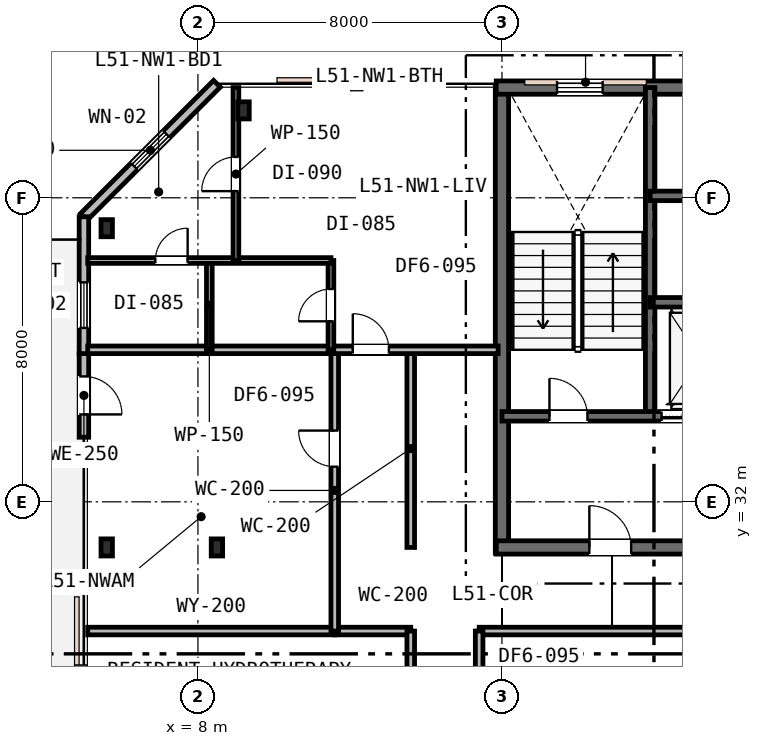
"""IFC4 building model, lengths in metres.
Left out: names, types, materials, properties, quantities, classifications, styles, units other than length and angle.
Written with IfcOpenShell. Run it as: python <this file> out.ifc"""

import sys

from ifc_helpers import new_model, si_unit, direction, frame, frame_2d, origin, origin_2d, place, context, subcontext, project, spatial, rectangle, i_section, extrude, element, fill, save


model = new_model("IFC4")
c1 = context("Model", 3, precision=1e-05, world=origin(), true_north=direction((0.0, 1.0)))
c2 = subcontext(c1, "Body", "Model", "MODEL_VIEW")
j1 = project(units=[si_unit("LENGTHUNIT", "METRE"), si_unit("PLANEANGLEUNIT", "RADIAN")], contexts=[c1])
p1 = place(None, origin())
s1 = spatial("IfcSite", under=j1, at=p1, CompositionType="ELEMENT")
p2 = place(p1, origin())
s2 = spatial("IfcBuilding", under=s1, at=p2, CompositionType="ELEMENT")
p3 = place(p2, frame((0.0, 0.0, 197.4)))
s3 = spatial("IfcBuildingStorey", under=s2, at=p3, CompositionType="ELEMENT", Elevation=197.4)
p4 = place(p3, frame((16.0, 30.65, 0.0), z_axis=(0.0, 0.0, 1.0), x_axis=(0.0, 1.0, 0.0)))
e1 = element("IfcWall", 1, at=p4, inside=s3, PredefinedType="SHEAR", context=c2, shape_type="SweptSolid", body=[
    extrude(rectangle(XDim=12.3, YDim=0.35, at=frame_2d((6.15, 0.0))), origin(), (0.0, 0.0, 1.0), 3.6),
])
p5 = place(p3, frame((15.85, 42.9, 0.0), z_axis=(0.0, 0.0, 1.0), x_axis=(1.0, 0.0, 0.0)))
e2 = element("IfcWall", 2, at=p5, inside=s3, PredefinedType="SHEAR", context=c2, shape_type="SweptSolid", body=[
    extrude(rectangle(XDim=24.3, YDim=0.35, at=frame_2d((12.15, 0.0))), origin(), (0.0, 0.0, 1.0), 3.6),
])
p6 = place(p5, frame((1.6, 0.0, 0.95)))
e3 = element("IfcOpeningElement", 3, at=p6, cuts=e2, PredefinedType="OPENING", context=c2, shape_type="SweptSolid", body=[
    extrude(rectangle(XDim=1.2, YDim=1.6, at=frame_2d((0.6, 0.8))), frame((0.0, 0.185, 0.0), z_axis=(0.0, -1.0, 0.0), x_axis=(1.0, 0.0, 0.0)), (0.0, 0.0, 1.0), 0.37),
])
p7 = place(p5, frame((16.5, 0.0, 0.95)))
e4 = element("IfcOpeningElement", 4, at=p7, cuts=e2, PredefinedType="OPENING", context=c2, shape_type="SweptSolid", body=[
    extrude(rectangle(XDim=1.2, YDim=1.6, at=frame_2d((0.6, 0.8))), frame((0.0, 0.185, 0.0), z_axis=(0.0, -1.0, 0.0), x_axis=(1.0, 0.0, 0.0)), (0.0, 0.0, 1.0), 0.37),
])
p8 = place(p5, frame((21.6, 0.0, 0.95)))
e5 = element("IfcOpeningElement", 5, at=p8, cuts=e2, PredefinedType="OPENING", context=c2, shape_type="SweptSolid", body=[
    extrude(rectangle(XDim=1.2, YDim=1.6, at=frame_2d((0.6, 0.8))), frame((0.0, 0.185, 0.0), z_axis=(0.0, -1.0, 0.0), x_axis=(1.0, 0.0, 0.0)), (0.0, 0.0, 1.0), 0.37),
])
p9 = place(p3, frame((15.85, 30.8, 0.0), z_axis=(0.0, 0.0, 1.0), x_axis=(1.0, 0.0, 0.0)))
e6 = element("IfcWall", 6, at=p9, inside=s3, PredefinedType="SHEAR", context=c2, shape_type="SweptSolid", body=[
    extrude(rectangle(XDim=11.2, YDim=0.35, at=frame_2d((5.6, 0.0))), origin(), (0.0, 0.0, 1.0), 3.6),
])
p10 = place(p9, frame((2.45, 0.0, 0.0)))
e7 = element("IfcOpeningElement", 7, at=p10, cuts=e6, PredefinedType="OPENING", context=c2, shape_type="SweptSolid", body=[
    extrude(rectangle(XDim=1.1, YDim=2.15, at=frame_2d((0.55, 1.075))), frame((0.0, 0.185, 0.0), z_axis=(0.0, -1.0, 0.0), x_axis=(1.0, 0.0, 0.0)), (0.0, 0.0, 1.0), 0.37),
])
p11 = place(p3, frame((19.9, 34.25, 0.0), z_axis=(0.0, 0.0, 1.0), x_axis=(0.0, 1.0, 0.0)))
e8 = element("IfcWall", 8, at=p11, inside=s3, PredefinedType="SHEAR", context=c2, shape_type="SweptSolid", body=[
    extrude(rectangle(XDim=8.65, YDim=0.25, at=frame_2d((4.325, 0.0))), origin(), (0.0, 0.0, 1.0), 3.6),
])
p12 = place(p3, frame((16.0, 34.25, 0.0), z_axis=(0.0, 0.0, 1.0), x_axis=(1.0, 0.0, 0.0)))
e9 = element("IfcWall", 9, at=p12, inside=s3, PredefinedType="SHEAR", context=c2, shape_type="SweptSolid", body=[
    extrude(rectangle(XDim=6.05, YDim=0.25, at=frame_2d((3.025, 0.0))), origin(), (0.0, 0.0, 1.0), 3.6),
])
p13 = place(p12, frame((1.25, 0.0, 0.0)))
e10 = element("IfcOpeningElement", 10, at=p13, cuts=e9, PredefinedType="OPENING", context=c2, shape_type="SweptSolid", body=[
    extrude(rectangle(XDim=1.0, YDim=2.15, at=frame_2d((0.5, 1.075))), frame((0.0, 0.135, 0.0), z_axis=(0.0, -1.0, 0.0), x_axis=(1.0, 0.0, 0.0)), (0.0, 0.0, 1.0), 0.27),
])
p14 = place(p12, frame((4.2, 0.0, 0.0)))
e11 = element("IfcOpeningElement", 11, at=p14, cuts=e9, PredefinedType="OPENING", context=c2, shape_type="SweptSolid", body=[
    extrude(rectangle(XDim=1.1, YDim=2.15, at=frame_2d((0.55, 1.075))), frame((0.0, 0.135, 0.0), z_axis=(0.0, -1.0, 0.0), x_axis=(1.0, 0.0, 0.0)), (0.0, 0.0, 1.0), 0.27),
])
p15 = place(p3, frame((19.9, 37.25, 0.0), z_axis=(0.0, 0.0, 1.0), x_axis=(1.0, 0.0, 0.0)))
e12 = element("IfcWall", 12, at=p15, inside=s3, PredefinedType="SHEAR", context=c2, shape_type="SweptSolid", body=[
    extrude(rectangle(XDim=16.2, YDim=0.25, at=frame_2d((8.1, 0.0))), origin(), (0.0, 0.0, 1.0), 3.6),
])
p16 = place(p15, frame((12.55, 0.0, 0.0)))
e13 = element("IfcOpeningElement", 13, at=p16, cuts=e12, PredefinedType="OPENING", context=c2, shape_type="SweptSolid", body=[
    extrude(rectangle(XDim=0.9, YDim=2.15, at=frame_2d((0.45, 1.075))), frame((0.0, 0.135, 0.0), z_axis=(0.0, -1.0, 0.0), x_axis=(1.0, 0.0, 0.0)), (0.0, 0.0, 1.0), 0.27),
])
p17 = place(p15, frame((2.5, 0.0, 0.0)))
e14 = element("IfcOpeningElement", 14, at=p17, cuts=e12, PredefinedType="OPENING", context=c2, shape_type="SweptSolid", body=[
    extrude(rectangle(XDim=1.05, YDim=2.15, at=frame_2d((0.525, 1.075))), frame((0.0, 0.135, 0.0), z_axis=(0.0, -1.0, 0.0), x_axis=(1.0, 0.0, 0.0)), (0.0, 0.0, 1.0), 0.27),
])
p18 = place(p15, frame((4.4, 0.0, 0.0)))
e15 = element("IfcOpeningElement", 15, at=p18, cuts=e12, PredefinedType="OPENING", context=c2, shape_type="SweptSolid", body=[
    extrude(rectangle(XDim=1.05, YDim=2.15, at=frame_2d((0.525, 1.075))), frame((0.0, 0.135, 0.0), z_axis=(0.0, -1.0, 0.0), x_axis=(1.0, 0.0, 0.0)), (0.0, 0.0, 1.0), 0.27),
])
p19 = place(p15, frame((6.3, 0.0, 0.0)))
e16 = element("IfcOpeningElement", 16, at=p19, cuts=e12, PredefinedType="OPENING", context=c2, shape_type="SweptSolid", body=[
    extrude(rectangle(XDim=1.05, YDim=2.15, at=frame_2d((0.525, 1.075))), frame((0.0, 0.135, 0.0), z_axis=(0.0, -1.0, 0.0), x_axis=(1.0, 0.0, 0.0)), (0.0, 0.0, 1.0), 0.27),
])
p20 = place(p3, frame((19.9, 40.05, 0.0), z_axis=(0.0, 0.0, 1.0), x_axis=(1.0, 0.0, 0.0)))
e17 = element("IfcWall", 17, at=p20, inside=s3, PredefinedType="SHEAR", context=c2, shape_type="SweptSolid", body=[
    extrude(rectangle(XDim=12.05, YDim=0.25, at=frame_2d((6.025, 0.0))), origin(), (0.0, 0.0, 1.0), 3.6),
])
for number, where, z_axis, x_axis in (
    (18, (5.6, 30.8, 0.0), (0.0, 0.0, 1.0), (1.0, 0.0, 0.0)),
    (19, (5.6, 39.2, 0.0), (0.0, 0.0, 1.0), (1.0, 0.0, 0.0)),
    (20, (8.5, 30.8, 0.0), (0.0, 0.0, 1.0), (1.0, 0.0, 0.0)),
    (21, (9.2, 42.3, 0.0), (0.0, 0.0, 1.0), (1.0, 0.0, 0.0)),
):
    element("IfcColumn", number, at=place(p3, frame(where, z_axis=z_axis, x_axis=x_axis)), inside=s3, PredefinedType="COLUMN", context=c2, shape_type="SweptSolid", body=[
        extrude(i_section(OverallWidth=0.3, OverallDepth=0.45, WebThickness=0.014, FlangeThickness=0.026, FilletRadius=0.027, at=origin_2d()), origin(), (0.0, 0.0, 1.0), 3.6),
    ])
p21 = place(p3, frame((8.5, 43.0, 0.0), z_axis=(0.0, 0.0, 1.0), x_axis=(-0.707106781187, -0.707106781187, 0.0)))
e22 = element("IfcWall", 22, at=p21, inside=s3, PredefinedType="STANDARD", context=c2, shape_type="SweptSolid", body=[
    extrude(rectangle(XDim=4.95, YDim=0.25, at=frame_2d((2.475, 0.0))), origin(), (0.0, 0.0, 1.0), 3.33),
])
p22 = place(p21, frame((1.875, 0.0, 0.85)))
e23 = element("IfcOpeningElement", 23, at=p22, cuts=e22, PredefinedType="OPENING", context=c2, shape_type="SweptSolid", body=[
    extrude(rectangle(XDim=1.2, YDim=1.6, at=frame_2d((0.6, 0.8))), frame((0.0, 0.135, 0.0), z_axis=(0.0, -1.0, 0.0), x_axis=(1.0, 0.0, 0.0)), (0.0, 0.0, 1.0), 0.27),
])
p23 = place(p3, frame((5.0, 35.9, 0.0), z_axis=(0.0, 0.0, 1.0), x_axis=(0.0, -1.0, 0.0)))
e24 = element("IfcWall", 24, at=p23, inside=s3, PredefinedType="STANDARD", context=c2, shape_type="SweptSolid", body=[
    extrude(rectangle(XDim=2.2, YDim=0.25, at=frame_2d((1.1, 0.0))), origin(), (0.0, 0.0, 1.0), 3.33),
])
p24 = place(p23, frame((0.6, 0.0, 0.0)))
e25 = element("IfcOpeningElement", 25, at=p24, cuts=e24, PredefinedType="OPENING", context=c2, shape_type="SweptSolid", body=[
    extrude(rectangle(XDim=1.0, YDim=2.15, at=frame_2d((0.5, 1.075))), frame((0.0, 0.135, 0.0), z_axis=(0.0, -1.0, 0.0), x_axis=(1.0, 0.0, 0.0)), (0.0, 0.0, 1.0), 0.27),
])
p25 = place(p3, frame((5.0, 39.5, 0.0), z_axis=(0.0, 0.0, 1.0), x_axis=(0.0, -1.0, 0.0)))
e26 = element("IfcWall", 26, at=p25, inside=s3, PredefinedType="STANDARD", context=c2, shape_type="SweptSolid", body=[
    extrude(rectangle(XDim=3.6, YDim=0.25, at=frame_2d((1.8, 0.0))), origin(), (0.0, 0.0, 1.0), 3.33),
])
p26 = place(p25, frame((1.725, 0.0, 0.85)))
e27 = element("IfcOpeningElement", 27, at=p26, cuts=e26, PredefinedType="OPENING", context=c2, shape_type="SweptSolid", body=[
    extrude(rectangle(XDim=1.2, YDim=1.6, at=frame_2d((0.6, 0.8))), frame((0.0, 0.135, 0.0), z_axis=(0.0, -1.0, 0.0), x_axis=(1.0, 0.0, 0.0)), (0.0, 0.0, 1.0), 0.27),
])
p27 = place(p3, frame((5.1, 28.6, 0.0), z_axis=(0.0, 0.0, 1.0), x_axis=(1.0, 0.0, 0.0)))
e28 = element("IfcWall", 28, at=p27, inside=s3, PredefinedType="PARTITIONING", context=c2, shape_type="SweptSolid", body=[
    extrude(rectangle(XDim=6.5, YDim=0.2, at=frame_2d((3.25, 0.0))), origin(), (0.0, 0.0, 1.0), 2.92),
])
p28 = place(p3, frame((11.6, 28.6, 0.0), z_axis=(0.0, 0.0, 1.0), x_axis=(1.0, 0.0, 0.0)))
e29 = element("IfcWall", 29, at=p28, inside=s3, PredefinedType="PARTITIONING", context=c2, shape_type="SweptSolid", body=[
    extrude(rectangle(XDim=2.0, YDim=0.2, at=frame_2d((1.0, 0.0))), origin(), (0.0, 0.0, 1.0), 3.33),
])
p29 = place(p3, frame((15.4, 28.6, 0.0), z_axis=(0.0, 0.0, 1.0), x_axis=(1.0, 0.0, 0.0)))
e30 = element("IfcWall", 30, at=p29, inside=s3, PredefinedType="PARTITIONING", context=c2, shape_type="SweptSolid", body=[
    extrude(rectangle(XDim=35.5, YDim=0.2, at=frame_2d((17.75, 0.0))), origin(), (0.0, 0.0, 1.0), 2.92),
])
p30 = place(p29, frame((11.525, 0.0, 0.0)))
e31 = element("IfcOpeningElement", 31, at=p30, cuts=e30, PredefinedType="OPENING", context=c2, shape_type="SweptSolid", body=[
    extrude(rectangle(XDim=0.95, YDim=2.15, at=frame_2d((0.475, 1.075))), frame((0.0, 0.11, 0.0), z_axis=(0.0, -1.0, 0.0), x_axis=(1.0, 0.0, 0.0)), (0.0, 0.0, 1.0), 0.22),
])
p31 = place(p29, frame((19.425, 0.0, 0.0)))
e32 = element("IfcOpeningElement", 32, at=p31, cuts=e30, PredefinedType="OPENING", context=c2, shape_type="SweptSolid", body=[
    extrude(rectangle(XDim=0.95, YDim=2.15, at=frame_2d((0.475, 1.075))), frame((0.0, 0.11, 0.0), z_axis=(0.0, -1.0, 0.0), x_axis=(1.0, 0.0, 0.0)), (0.0, 0.0, 1.0), 0.22),
])
p32 = place(p29, frame((26.275, 0.0, 0.0)))
e33 = element("IfcOpeningElement", 33, at=p32, cuts=e30, PredefinedType="OPENING", context=c2, shape_type="SweptSolid", body=[
    extrude(rectangle(XDim=0.95, YDim=2.15, at=frame_2d((0.475, 1.075))), frame((0.0, 0.11, 0.0), z_axis=(0.0, -1.0, 0.0), x_axis=(1.0, 0.0, 0.0)), (0.0, 0.0, 1.0), 0.22),
])
p33 = place(p3, frame((13.6, 30.8, 0.0), z_axis=(0.0, 0.0, 1.0), x_axis=(0.0, 1.0, 0.0)))
e34 = element("IfcWall", 34, at=p33, inside=s3, PredefinedType="PARTITIONING", context=c2, shape_type="SweptSolid", body=[
    extrude(rectangle(XDim=5.2, YDim=0.2, at=frame_2d((2.6, 0.0))), origin(), (0.0, 0.0, 1.0), 2.92),
])
p34 = place(p3, frame((11.6, 28.6, 0.0), z_axis=(0.0, 0.0, 1.0), x_axis=(0.0, 1.0, 0.0)))
e35 = element("IfcWall", 35, at=p34, inside=s3, PredefinedType="PARTITIONING", context=c2, shape_type="SweptSolid", body=[
    extrude(rectangle(XDim=7.4, YDim=0.2, at=frame_2d((3.7, 0.0))), origin(), (0.0, 0.0, 1.0), 2.92),
])
p35 = place(p34, frame((4.325, 0.0, 0.0)))
e36 = element("IfcOpeningElement", 36, at=p35, cuts=e35, PredefinedType="OPENING", context=c2, shape_type="SweptSolid", body=[
    extrude(rectangle(XDim=0.95, YDim=2.15, at=frame_2d((0.475, 1.075))), frame((0.0, 0.11, 0.0), z_axis=(0.0, -1.0, 0.0), x_axis=(1.0, 0.0, 0.0)), (0.0, 0.0, 1.0), 0.22),
])
p36 = place(p3, frame((5.1, 36.0, 0.0), z_axis=(0.0, 0.0, 1.0), x_axis=(1.0, 0.0, 0.0)))
e37 = element("IfcWall", 37, at=p36, inside=s3, PredefinedType="PARTITIONING", context=c2, shape_type="SweptSolid", body=[
    extrude(rectangle(XDim=10.8, YDim=0.2, at=frame_2d((5.4, 0.0))), origin(), (0.0, 0.0, 1.0), 3.02),
])
p37 = place(p36, frame((6.975, 0.0, 0.0)))
e38 = element("IfcOpeningElement", 38, at=p37, cuts=e37, PredefinedType="OPENING", context=c2, shape_type="SweptSolid", body=[
    extrude(rectangle(XDim=0.95, YDim=2.15, at=frame_2d((0.475, 1.075))), frame((0.0, 0.11, 0.0), z_axis=(0.0, -1.0, 0.0), x_axis=(1.0, 0.0, 0.0)), (0.0, 0.0, 1.0), 0.22),
])
p38 = place(p3, frame((11.5, 36.0, 0.0), z_axis=(0.0, 0.0, 1.0), x_axis=(0.0, 1.0, 0.0)))
e39 = element("IfcWall", 39, at=p38, inside=s3, PredefinedType="PARTITIONING", context=c2, shape_type="SweptSolid", body=[
    extrude(rectangle(XDim=2.35, YDim=0.15, at=frame_2d((1.175, 0.0))), origin(), (0.0, 0.0, 1.0), 3.33),
])
p39 = place(p38, frame((0.75, 0.0, 0.0)))
e40 = element("IfcOpeningElement", 40, at=p39, cuts=e39, PredefinedType="OPENING", context=c2, shape_type="SweptSolid", body=[
    extrude(rectangle(XDim=0.85, YDim=2.15, at=frame_2d((0.425, 1.075))), frame((0.0, 0.085, 0.0), z_axis=(0.0, -1.0, 0.0), x_axis=(1.0, 0.0, 0.0)), (0.0, 0.0, 1.0), 0.17),
])
p40 = place(p3, frame((8.3, 36.0, 0.0), z_axis=(0.0, 0.0, 1.0), x_axis=(0.0, 1.0, 0.0)))
e41 = element("IfcWall", 41, at=p40, inside=s3, PredefinedType="PARTITIONING", context=c2, shape_type="SweptSolid", body=[
    extrude(rectangle(XDim=2.35, YDim=0.15, at=frame_2d((1.175, 0.0))), origin(), (0.0, 0.0, 1.0), 3.33),
])
p41 = place(p3, frame((5.1, 38.35, 0.0), z_axis=(0.0, 0.0, 1.0), x_axis=(1.0, 0.0, 0.0)))
e42 = element("IfcWall", 42, at=p41, inside=s3, PredefinedType="PARTITIONING", context=c2, shape_type="SweptSolid", body=[
    extrude(rectangle(XDim=6.4, YDim=0.15, at=frame_2d((3.2, 0.0))), origin(), (0.0, 0.0, 1.0), 3.02),
])
p42 = place(p41, frame((1.78, 0.0, 0.0)))
e43 = element("IfcOpeningElement", 43, at=p42, cuts=e42, PredefinedType="OPENING", context=c2, shape_type="SweptSolid", body=[
    extrude(rectangle(XDim=0.85, YDim=2.15, at=frame_2d((0.425, 1.075))), frame((0.0, 0.085, 0.0), z_axis=(0.0, -1.0, 0.0), x_axis=(1.0, 0.0, 0.0)), (0.0, 0.0, 1.0), 0.17),
])
p43 = place(p3, frame((9.0, 38.35, 0.0), z_axis=(0.0, 0.0, 1.0), x_axis=(0.0, 1.0, 0.0)))
e44 = element("IfcWall", 44, at=p43, inside=s3, PredefinedType="PARTITIONING", context=c2, shape_type="SweptSolid", body=[
    extrude(rectangle(XDim=4.55, YDim=0.15, at=frame_2d((2.275, 0.0))), origin(), (0.0, 0.0, 1.0), 3.02),
])
p44 = place(p43, frame((1.825, 0.0, 0.0)))
e45 = element("IfcOpeningElement", 45, at=p44, cuts=e44, PredefinedType="OPENING", context=c2, shape_type="SweptSolid", body=[
    extrude(rectangle(XDim=0.9, YDim=2.15, at=frame_2d((0.45, 1.075))), frame((0.0, 0.085, 0.0), z_axis=(0.0, -1.0, 0.0), x_axis=(1.0, 0.0, 0.0)), (0.0, 0.0, 1.0), 0.17),
])
p45 = place(p3, frame((13.6, 17.0, 0.0), z_axis=(0.0, 0.0, 1.0), x_axis=(0.0, 1.0, 0.0)))
e46 = element("IfcWall", 46, at=p45, inside=s3, PredefinedType="PARTITIONING", context=c2, shape_type="SweptSolid", body=[
    extrude(rectangle(XDim=11.6, YDim=0.2, at=frame_2d((5.8, 0.0))), origin(), (0.0, 0.0, 1.0), 2.92),
])
p46 = place(p45, frame((8.996, 0.0, 0.0)))
e47 = element("IfcOpeningElement", 47, at=p46, cuts=e46, PredefinedType="OPENING", context=c2, shape_type="SweptSolid", body=[
    extrude(rectangle(XDim=0.95, YDim=2.15, at=frame_2d((0.475, 1.075))), frame((0.0, 0.11, 0.0), z_axis=(0.0, -1.0, 0.0), x_axis=(1.0, 0.0, 0.0)), (0.0, 0.0, 1.0), 0.22),
])
p47 = place(p45, frame((2.269, 0.0, 0.0)))
e48 = element("IfcOpeningElement", 48, at=p47, cuts=e46, PredefinedType="OPENING", context=c2, shape_type="SweptSolid", body=[
    extrude(rectangle(XDim=0.95, YDim=2.15, at=frame_2d((0.475, 1.075))), frame((0.0, 0.11, 0.0), z_axis=(0.0, -1.0, 0.0), x_axis=(1.0, 0.0, 0.0)), (0.0, 0.0, 1.0), 0.22),
])
p48 = place(p3, frame((15.4, 17.0, 0.0), z_axis=(0.0, 0.0, 1.0), x_axis=(0.0, 1.0, 0.0)))
e49 = element("IfcWall", 49, at=p48, inside=s3, PredefinedType="PARTITIONING", context=c2, shape_type="SweptSolid", body=[
    extrude(rectangle(XDim=11.6, YDim=0.2, at=frame_2d((5.8, 0.0))), origin(), (0.0, 0.0, 1.0), 2.92),
])
p49 = place(p48, frame((9.095, 0.0, 0.0)))
e50 = element("IfcOpeningElement", 50, at=p49, cuts=e49, PredefinedType="OPENING", context=c2, shape_type="SweptSolid", body=[
    extrude(rectangle(XDim=0.95, YDim=2.15, at=frame_2d((0.475, 1.075))), frame((0.0, 0.11, 0.0), z_axis=(0.0, -1.0, 0.0), x_axis=(1.0, 0.0, 0.0)), (0.0, 0.0, 1.0), 0.22),
])
p50 = place(p48, frame((3.295, 0.0, 0.0)))
e51 = element("IfcOpeningElement", 51, at=p50, cuts=e49, PredefinedType="OPENING", context=c2, shape_type="SweptSolid", body=[
    extrude(rectangle(XDim=0.95, YDim=2.15, at=frame_2d((0.475, 1.075))), frame((0.0, 0.11, 0.0), z_axis=(0.0, -1.0, 0.0), x_axis=(1.0, 0.0, 0.0)), (0.0, 0.0, 1.0), 0.22),
])
p51 = place(p6, origin())
e52 = element("IfcWindow", 52, at=p51, inside=s3, PartitioningType="SINGLE_PANEL", PredefinedType="WINDOW", context=c2, shape_type="SweptSolid", body=[
    extrude(rectangle(XDim=1.2, YDim=1.6, at=frame_2d((0.6, 0.8))), frame((0.0, 0.03, 0.0), z_axis=(0.0, -1.0, 0.0), x_axis=(1.0, 0.0, 0.0)), (0.0, 0.0, 1.0), 0.06),
])
fill(e3, e52)
p52 = place(p22, origin())
e53 = element("IfcWindow", 53, at=p52, inside=s3, PartitioningType="SINGLE_PANEL", PredefinedType="WINDOW", context=c2, shape_type="SweptSolid", body=[
    extrude(rectangle(XDim=1.2, YDim=1.6, at=frame_2d((0.6, 0.8))), frame((0.0, 0.03, 0.0), z_axis=(0.0, -1.0, 0.0), x_axis=(1.0, 0.0, 0.0)), (0.0, 0.0, 1.0), 0.06),
])
fill(e23, e53)
p53 = place(p24, origin())
e54 = element("IfcDoor", 54, at=p53, inside=s3, OperationType="SINGLE_SWING_RIGHT", PredefinedType="DOOR", context=c2, shape_type="SweptSolid", body=[
    extrude(rectangle(XDim=1.0, YDim=2.15, at=frame_2d((0.5, 1.075))), frame((0.0, 0.025, 0.0), z_axis=(0.0, -1.0, 0.0), x_axis=(1.0, 0.0, 0.0)), (0.0, 0.0, 1.0), 0.05),
])
fill(e25, e54)
p54 = place(p26, origin())
e55 = element("IfcWindow", 55, at=p54, inside=s3, PartitioningType="SINGLE_PANEL", PredefinedType="WINDOW", context=c2, shape_type="SweptSolid", body=[
    extrude(rectangle(XDim=1.2, YDim=1.6, at=frame_2d((0.6, 0.8))), frame((0.0, 0.03, 0.0), z_axis=(0.0, -1.0, 0.0), x_axis=(1.0, 0.0, 0.0)), (0.0, 0.0, 1.0), 0.06),
])
fill(e27, e55)
p55 = place(p13, origin())
e56 = element("IfcDoor", 56, at=p55, inside=s3, OperationType="SINGLE_SWING_LEFT", PredefinedType="DOOR", context=c2, shape_type="SweptSolid", body=[
    extrude(rectangle(XDim=1.0, YDim=2.15, at=frame_2d((0.5, 1.075))), frame((0.0, 0.025, 0.0), z_axis=(0.0, -1.0, 0.0), x_axis=(1.0, 0.0, 0.0)), (0.0, 0.0, 1.0), 0.05),
])
fill(e10, e56)
p56 = place(p10, origin())
e57 = element("IfcDoor", 57, at=p56, inside=s3, OperationType="SINGLE_SWING_LEFT", PredefinedType="DOOR", context=c2, shape_type="SweptSolid", body=[
    extrude(rectangle(XDim=1.1, YDim=2.15, at=frame_2d((0.55, 1.075))), frame((0.0, 0.025, 0.0), z_axis=(0.0, -1.0, 0.0), x_axis=(1.0, 0.0, 0.0)), (0.0, 0.0, 1.0), 0.05),
])
fill(e7, e57)
p57 = place(p35, origin())
e58 = element("IfcDoor", 58, at=p57, inside=s3, OperationType="SINGLE_SWING_RIGHT", PredefinedType="DOOR", context=c2, shape_type="SweptSolid", body=[
    extrude(rectangle(XDim=0.95, YDim=2.15, at=frame_2d((0.475, 1.075))), frame((0.0, 0.025, 0.0), z_axis=(0.0, -1.0, 0.0), x_axis=(1.0, 0.0, 0.0)), (0.0, 0.0, 1.0), 0.05),
])
fill(e36, e58)
p58 = place(p37, origin())
e59 = element("IfcDoor", 59, at=p58, inside=s3, OperationType="SINGLE_SWING_LEFT", PredefinedType="DOOR", context=c2, shape_type="SweptSolid", body=[
    extrude(rectangle(XDim=0.95, YDim=2.15, at=frame_2d((0.475, 1.075))), frame((0.0, 0.025, 0.0), z_axis=(0.0, -1.0, 0.0), x_axis=(1.0, 0.0, 0.0)), (0.0, 0.0, 1.0), 0.05),
])
fill(e38, e59)
p59 = place(p39, origin())
e60 = element("IfcDoor", 60, at=p59, inside=s3, OperationType="SINGLE_SWING_LEFT", PredefinedType="DOOR", context=c2, shape_type="SweptSolid", body=[
    extrude(rectangle(XDim=0.85, YDim=2.15, at=frame_2d((0.425, 1.075))), frame((0.0, 0.025, 0.0), z_axis=(0.0, -1.0, 0.0), x_axis=(1.0, 0.0, 0.0)), (0.0, 0.0, 1.0), 0.05),
])
fill(e40, e60)
p60 = place(p42, origin())
e61 = element("IfcDoor", 61, at=p60, inside=s3, OperationType="SINGLE_SWING_RIGHT", PredefinedType="DOOR", context=c2, shape_type="SweptSolid", body=[
    extrude(rectangle(XDim=0.85, YDim=2.15, at=frame_2d((0.425, 1.075))), frame((0.0, 0.025, 0.0), z_axis=(0.0, -1.0, 0.0), x_axis=(1.0, 0.0, 0.0)), (0.0, 0.0, 1.0), 0.05),
])
fill(e43, e61)
p61 = place(p44, origin())
e62 = element("IfcDoor", 62, at=p61, inside=s3, OperationType="SINGLE_SWING_LEFT", PredefinedType="DOOR", context=c2, shape_type="SweptSolid", body=[
    extrude(rectangle(XDim=0.9, YDim=2.15, at=frame_2d((0.45, 1.075))), frame((0.0, 0.025, 0.0), z_axis=(0.0, -1.0, 0.0), x_axis=(1.0, 0.0, 0.0)), (0.0, 0.0, 1.0), 0.05),
])
fill(e45, e62)
p62 = place(p14, origin())
e63 = element("IfcDoor", 63, at=p62, inside=s3, OperationType="DOUBLE_DOOR_SLIDING", PredefinedType="DOOR", context=c2, shape_type="SweptSolid", body=[
    extrude(rectangle(XDim=1.1, YDim=2.15, at=frame_2d((0.55, 1.075))), frame((0.0, 0.025, 0.0), z_axis=(0.0, -1.0, 0.0), x_axis=(1.0, 0.0, 0.0)), (0.0, 0.0, 1.0), 0.05),
])
fill(e11, e63)
save(model, sys.argv[1])
